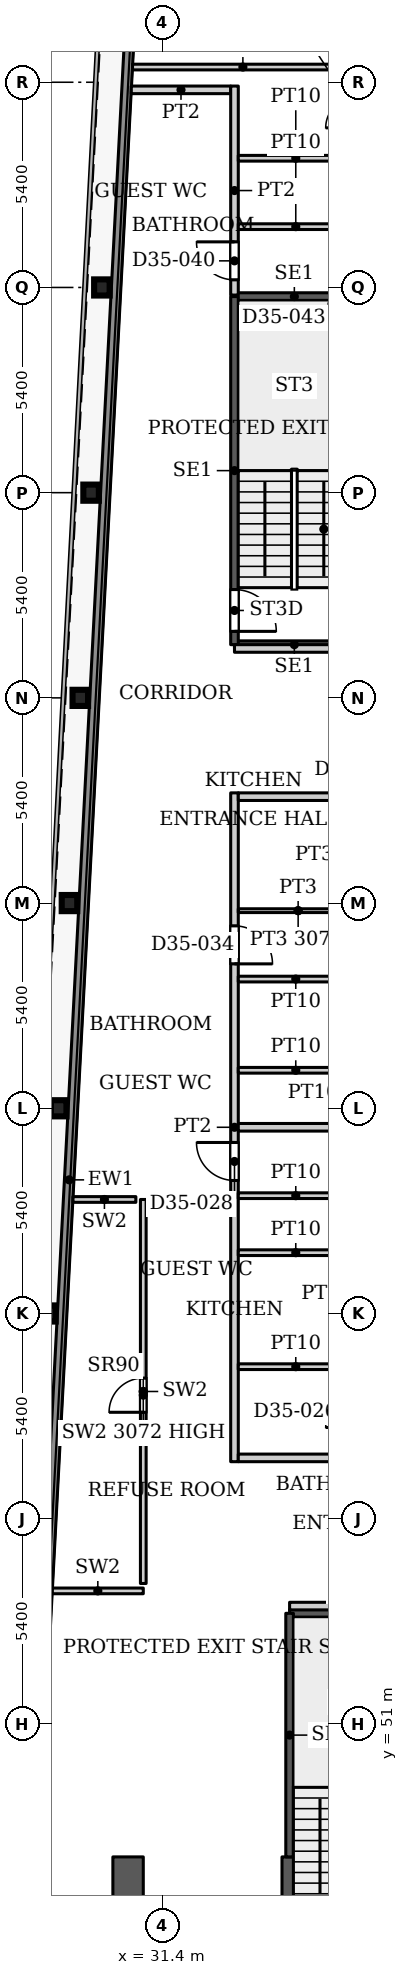
"""IFC4 building model, lengths in metres.
Left out: names, types, materials, properties, quantities, classifications, styles, units other than length and angle.
Written with IfcOpenShell. Run it as: python <this file> out.ifc"""

import sys

from ifc_helpers import new_model, si_unit, direction, frame, frame_2d, origin, origin_2d, place, context, subcontext, project, spatial, rectangle, i_section, extrude, source, transform, mapped, element, fill, save


model = new_model("IFC4")
c1 = context("Model", 3, precision=1e-05, world=origin(), true_north=direction((0.0, 1.0)))
c2 = subcontext(c1, "Body", "Model", "MODEL_VIEW")
j1 = project(units=[si_unit("LENGTHUNIT", "METRE"), si_unit("PLANEANGLEUNIT", "RADIAN")], contexts=[c1])
p1 = place(None, origin())
s1 = spatial("IfcSite", under=j1, at=p1, CompositionType="ELEMENT")
p2 = place(p1, origin())
s2 = spatial("IfcBuilding", under=s1, at=p2, CompositionType="ELEMENT")
p3 = place(p2, frame((0.0, 0.0, 156.5)))
s3 = spatial("IfcBuildingStorey", under=s2, at=p3, CompositionType="ELEMENT", Elevation=156.5)
for number, where, z_axis, x_axis in (
    (1, (28.39, 61.8, 0.0), (0.0, 0.0, 1.0), (1.0, 0.0, 0.0)),
    (2, (28.674, 67.2, 0.0), (0.0, 0.0, 1.0), (1.0, 0.0, 0.0)),
    (3, (28.958, 72.6, 0.0), (0.0, 0.0, 1.0), (1.0, 0.0, 0.0)),
    (4, (29.243, 78.0, 0.0), (0.0, 0.0, 1.0), (1.0, 0.0, 0.0)),
    (5, (29.527, 83.4, 0.0), (0.0, 0.0, 1.0), (1.0, 0.0, 0.0)),
    (6, (29.811, 88.8, 0.0), (0.0, 0.0, 1.0), (1.0, 0.0, 0.0)),
):
    element("IfcColumn", number, at=place(p3, frame(where, z_axis=z_axis, x_axis=x_axis)), inside=s3, PredefinedType="COLUMN", context=c2, shape_type="SweptSolid", body=[
        extrude(i_section(OverallWidth=0.409, OverallDepth=0.425, WebThickness=0.033, FlangeThickness=0.052, FilletRadius=0.013, at=origin_2d()), origin(), (0.0, 0.0, 1.0), 3.9),
    ])
p4 = place(p3, frame((34.75, 29.05, 0.0), z_axis=(0.0, 0.0, 1.0), x_axis=(0.0, 1.0, 0.0)))
e7 = element("IfcWall", 7, at=p4, inside=s3, PredefinedType="SHEAR", context=c2, shape_type="SweptSolid", body=[
    extrude(rectangle(XDim=18.45, YDim=0.4, at=frame_2d((9.225, 0.0))), origin(), (0.0, 0.0, 1.0), 3.9),
])
p5 = place(p4, frame((8.025, 0.0, 0.0)))
e8 = element("IfcOpeningElement", 8, at=p5, cuts=e7, PredefinedType="OPENING", context=c2, shape_type="SweptSolid", body=[
    extrude(rectangle(XDim=1.1, YDim=2.2, at=frame_2d((0.55, 1.1))), frame((0.0, 0.21, 0.0), z_axis=(0.0, -1.0, 0.0), x_axis=(1.0, 0.0, 0.0)), (0.0, 0.0, 1.0), 0.42),
])
p6 = place(p4, frame((10.875, 0.0, 0.0)))
e9 = element("IfcOpeningElement", 9, at=p6, cuts=e7, PredefinedType="OPENING", context=c2, shape_type="SweptSolid", body=[
    extrude(rectangle(XDim=1.1, YDim=2.2, at=frame_2d((0.55, 1.1))), frame((0.0, 0.21, 0.0), z_axis=(0.0, -1.0, 0.0), x_axis=(1.0, 0.0, 0.0)), (0.0, 0.0, 1.0), 0.42),
])
p7 = place(p4, frame((13.725, 0.0, 0.0)))
e10 = element("IfcOpeningElement", 10, at=p7, cuts=e7, PredefinedType="OPENING", context=c2, shape_type="SweptSolid", body=[
    extrude(rectangle(XDim=1.1, YDim=2.2, at=frame_2d((0.55, 1.1))), frame((0.0, 0.21, 0.0), z_axis=(0.0, -1.0, 0.0), x_axis=(1.0, 0.0, 0.0)), (0.0, 0.0, 1.0), 0.42),
])
p8 = place(p4, frame((15.95, 0.0, 0.0)))
e11 = element("IfcOpeningElement", 11, at=p8, cuts=e7, PredefinedType="OPENING", context=c2, shape_type="SweptSolid", body=[
    extrude(rectangle(XDim=1.1, YDim=2.2, at=frame_2d((0.55, 1.1))), frame((0.0, 0.21, 0.0), z_axis=(0.0, -1.0, 0.0), x_axis=(1.0, 0.0, 0.0)), (0.0, 0.0, 1.0), 0.42),
])
p9 = place(p3, frame((30.5, 29.05, 0.0), z_axis=(0.0, 0.0, 1.0), x_axis=(0.0, 1.0, 0.0)))
e12 = element("IfcWall", 12, at=p9, inside=s3, PredefinedType="SHEAR", context=c2, shape_type="SweptSolid", body=[
    extrude(rectangle(XDim=18.45, YDim=0.8, at=frame_2d((9.225, 0.0))), origin(), (0.0, 0.0, 1.0), 3.9),
])
p10 = place(p9, frame((6.55, 0.0, 0.0)))
e13 = element("IfcOpeningElement", 13, at=p10, cuts=e12, PredefinedType="OPENING", context=c2, shape_type="SweptSolid", body=[
    extrude(rectangle(XDim=0.9, YDim=2.2, at=frame_2d((0.45, 1.1))), frame((0.0, 0.41, 0.0), z_axis=(0.0, -1.0, 0.0), x_axis=(1.0, 0.0, 0.0)), (0.0, 0.0, 1.0), 0.82),
])
p11 = place(p9, frame((11.025, 0.0, 0.0)))
e14 = element("IfcOpeningElement", 14, at=p11, cuts=e12, PredefinedType="OPENING", context=c2, shape_type="SweptSolid", body=[
    extrude(rectangle(XDim=0.9, YDim=2.2, at=frame_2d((0.45, 1.1))), frame((0.0, 0.41, 0.0), z_axis=(0.0, -1.0, 0.0), x_axis=(1.0, 0.0, 0.0)), (0.0, 0.0, 1.0), 0.82),
])
p12 = place(p3, frame((27.195, 31.969, 0.0), z_axis=(0.0, 0.0, 1.0), x_axis=(0.052554995867, 0.998618031286, 0.0)))
e15 = element("IfcWall", 15, at=p12, inside=s3, PredefinedType="SOLIDWALL", context=c2, shape_type="SweptSolid", body=[
    extrude(rectangle(XDim=66.787, YDim=0.25, at=frame_2d((33.394, 0.0))), origin(), (0.0, 0.0, 1.0), 3.75),
])
p13 = place(p3, frame((34.75, 53.91, 0.0), z_axis=(0.0, 0.0, 1.0), x_axis=(1.0, 0.0, 0.0)))
e16 = element("IfcWall", 16, at=p13, inside=s3, PredefinedType="SHEAR", context=c2, shape_type="SweptSolid", body=[
    extrude(rectangle(XDim=3.15, YDim=0.2, at=frame_2d((1.575, 0.0))), origin(), (0.0, 0.0, 1.0), 3.9),
])
p14 = place(p3, frame((34.75, 47.5, 0.0), z_axis=(0.0, 0.0, 1.0), x_axis=(0.0, 1.0, 0.0)))
e17 = element("IfcWall", 17, at=p14, inside=s3, PredefinedType="SHEAR", context=c2, shape_type="SweptSolid", body=[
    extrude(rectangle(XDim=6.41, YDim=0.2, at=frame_2d((3.205, 0.0))), origin(), (0.0, 0.0, 1.0), 3.9),
])
for number, where, z_axis, x_axis in (
    (18, (33.3, 79.4, 0.0), (0.0, 0.0, 1.0), (1.0, 0.0, 0.0)),
    (19, (33.3, 88.56, 0.0), (0.0, 0.0, 1.0), (1.0, 0.0, 0.0)),
):
    element("IfcWall", number, at=place(p3, frame(where, z_axis=z_axis, x_axis=x_axis)), inside=s3, PredefinedType="SHEAR", context=c2, shape_type="SweptSolid", body=[
        extrude(rectangle(XDim=3.15, YDim=0.2, at=frame_2d((1.575, 0.0))), origin(), (0.0, 0.0, 1.0), 3.9),
    ])
p15 = place(p3, frame((33.3, 79.4, 0.0), z_axis=(0.0, 0.0, 1.0), x_axis=(0.0, 1.0, 0.0)))
e20 = element("IfcWall", 20, at=p15, inside=s3, PredefinedType="SHEAR", context=c2, shape_type="SweptSolid", body=[
    extrude(rectangle(XDim=9.16, YDim=0.2, at=frame_2d((4.58, 0.0))), origin(), (0.0, 0.0, 1.0), 3.9),
])
p16 = place(p15, frame((0.35, 0.0, 0.0)))
e21 = element("IfcOpeningElement", 21, at=p16, cuts=e20, PredefinedType="OPENING", context=c2, shape_type="SweptSolid", body=[
    extrude(rectangle(XDim=1.1, YDim=2.2, at=frame_2d((0.55, 1.1))), frame((0.0, 0.11, 0.0), z_axis=(0.0, -1.0, 0.0), x_axis=(1.0, 0.0, 0.0)), (0.0, 0.0, 1.0), 0.22),
])
p17 = place(p3, frame((28.508, 54.5, 0.0), z_axis=(0.0, 0.0, 1.0), x_axis=(1.0, 0.0, 0.0)))
e22 = element("IfcWall", 22, at=p17, inside=s3, PredefinedType="PARTITIONING", context=c2, shape_type="SweptSolid", body=[
    extrude(rectangle(XDim=2.392, YDim=0.15, at=frame_2d((1.196, 0.0))), origin(), (0.0, 0.0, 1.0), 3.9),
])
p18 = place(p3, frame((30.9, 54.695, 0.0), z_axis=(0.0, 0.0, 1.0), x_axis=(0.0, 1.0, 0.0)))
e23 = element("IfcWall", 23, at=p18, inside=s3, PredefinedType="PARTITIONING", context=c2, shape_type="SweptSolid", body=[
    extrude(rectangle(XDim=10.105, YDim=0.15, at=frame_2d((5.052, 0.0))), origin(), (0.0, 0.0, 1.0), 3.072),
])
p19 = place(p18, frame((4.505, 0.0, 0.0)))
e24 = element("IfcOpeningElement", 24, at=p19, cuts=e23, PredefinedType="OPENING", context=c2, shape_type="SweptSolid", body=[
    extrude(rectangle(XDim=0.9, YDim=2.2, at=frame_2d((0.45, 1.1))), frame((0.0, 0.085, 0.0), z_axis=(0.0, -1.0, 0.0), x_axis=(1.0, 0.0, 0.0)), (0.0, 0.0, 1.0), 0.17),
])
p20 = place(p3, frame((29.05, 64.8, 0.0), z_axis=(0.0, 0.0, 1.0), x_axis=(1.0, 0.0, 0.0)))
e25 = element("IfcWall", 25, at=p20, inside=s3, PredefinedType="PARTITIONING", context=c2, shape_type="SweptSolid", body=[
    extrude(rectangle(XDim=1.655, YDim=0.15, at=frame_2d((0.828, 0.0))), origin(), (0.0, 0.0, 1.0), 3.9),
])
p21 = place(p3, frame((30.617, 94.6, 0.0), z_axis=(0.0, 0.0, 1.0), x_axis=(1.0, 0.0, 0.0)))
e26 = element("IfcWall", 26, at=p21, inside=s3, PredefinedType="PARTITIONING", context=c2, shape_type="SweptSolid", body=[
    extrude(rectangle(XDim=5.808, YDim=0.15, at=frame_2d((2.904, 0.0))), origin(), (0.0, 0.0, 1.0), 3.6),
])
p22 = place(p3, frame((30.585, 94.0, 0.0), z_axis=(0.0, 0.0, 1.0), x_axis=(1.0, 0.0, 0.0)))
e27 = element("IfcWall", 27, at=p22, inside=s3, PredefinedType="PARTITIONING", context=c2, shape_type="SweptSolid", body=[
    extrude(rectangle(XDim=2.615, YDim=0.2, at=frame_2d((1.308, 0.0))), origin(), (0.0, 0.0, 1.0), 3.6),
])
p23 = place(p3, frame((33.3, 57.9, 0.0), z_axis=(0.0, 0.0, 1.0), x_axis=(0.0, 1.0, 0.0)))
e28 = element("IfcWall", 28, at=p23, inside=s3, PredefinedType="PARTITIONING", context=c2, shape_type="SweptSolid", body=[
    extrude(rectangle(XDim=17.6, YDim=0.2, at=frame_2d((8.8, 0.0))), origin(), (0.0, 0.0, 1.0), 3.6),
])
p24 = place(p23, frame((7.4, 0.0, 0.0)))
e29 = element("IfcOpeningElement", 29, at=p24, cuts=e28, PredefinedType="OPENING", context=c2, shape_type="SweptSolid", body=[
    extrude(rectangle(XDim=1.0, YDim=2.1, at=frame_2d((0.5, 1.05))), frame((0.0, 0.11, 0.0), z_axis=(0.0, -1.0, 0.0), x_axis=(1.0, 0.0, 0.0)), (0.0, 0.0, 1.0), 0.22),
])
p25 = place(p23, frame((13.1, 0.0, 0.0)))
e30 = element("IfcOpeningElement", 30, at=p25, cuts=e28, PredefinedType="OPENING", context=c2, shape_type="SweptSolid", body=[
    extrude(rectangle(XDim=1.0, YDim=2.1, at=frame_2d((0.5, 1.05))), frame((0.0, 0.11, 0.0), z_axis=(0.0, -1.0, 0.0), x_axis=(1.0, 0.0, 0.0)), (0.0, 0.0, 1.0), 0.22),
])
p26 = place(p3, frame((33.3, 79.3, 0.0), z_axis=(0.0, 0.0, 1.0), x_axis=(1.0, 0.0, 0.0)))
e31 = element("IfcWall", 31, at=p26, inside=s3, PredefinedType="PARTITIONING", context=c2, shape_type="SweptSolid", body=[
    extrude(rectangle(XDim=12.6, YDim=0.2, at=frame_2d((6.3, 0.0))), origin(), (0.0, 0.0, 1.0), 3.6),
])
p27 = place(p26, frame((5.795, 0.0, 0.0)))
e32 = element("IfcOpeningElement", 32, at=p27, cuts=e31, PredefinedType="OPENING", context=c2, shape_type="SweptSolid", body=[
    extrude(rectangle(XDim=1.0, YDim=2.1, at=frame_2d((0.5, 1.05))), frame((0.0, 0.11, 0.0), z_axis=(0.0, -1.0, 0.0), x_axis=(1.0, 0.0, 0.0)), (0.0, 0.0, 1.0), 0.22),
])
p28 = place(p3, frame((33.3, 88.6, 0.0), z_axis=(0.0, 0.0, 1.0), x_axis=(0.0, 1.0, 0.0)))
e33 = element("IfcWall", 33, at=p28, inside=s3, PredefinedType="PARTITIONING", context=c2, shape_type="SweptSolid", body=[
    extrude(rectangle(XDim=5.5, YDim=0.2, at=frame_2d((2.75, 0.0))), origin(), (0.0, 0.0, 1.0), 3.6),
])
p29 = place(p28, frame((0.4, 0.0, 0.0)))
e34 = element("IfcOpeningElement", 34, at=p29, cuts=e33, PredefinedType="OPENING", context=c2, shape_type="SweptSolid", body=[
    extrude(rectangle(XDim=1.0, YDim=2.1, at=frame_2d((0.5, 1.05))), frame((0.0, 0.11, 0.0), z_axis=(0.0, -1.0, 0.0), x_axis=(1.0, 0.0, 0.0)), (0.0, 0.0, 1.0), 0.22),
])
p30 = place(p3, frame((33.4, 58.0, 0.0), z_axis=(0.0, 0.0, 1.0), x_axis=(1.0, 0.0, 0.0)))
e35 = element("IfcWall", 35, at=p30, inside=s3, PredefinedType="PARTITIONING", context=c2, shape_type="SweptSolid", body=[
    extrude(rectangle(XDim=12.5, YDim=0.2, at=frame_2d((6.25, 0.0))), origin(), (0.0, 0.0, 1.0), 3.6),
])
for number, where, z_axis, x_axis in (
    (36, (33.4, 60.4, 0.0), (0.0, 0.0, 1.0), (1.0, 0.0, 0.0)),
    (37, (33.4, 63.4, 0.0), (0.0, 0.0, 1.0), (1.0, 0.0, 0.0)),
    (38, (33.4, 64.9, 0.0), (0.0, 0.0, 1.0), (1.0, 0.0, 0.0)),
):
    element("IfcWall", number, at=place(p3, frame(where, z_axis=z_axis, x_axis=x_axis)), inside=s3, PredefinedType="PARTITIONING", context=c2, shape_type="SweptSolid", body=[
        extrude(rectangle(XDim=3.025, YDim=0.15, at=frame_2d((1.513, 0.0))), origin(), (0.0, 0.0, 1.0), 3.6),
    ])
p31 = place(p3, frame((33.4, 66.7, 0.0), z_axis=(0.0, 0.0, 1.0), x_axis=(1.0, 0.0, 0.0)))
e39 = element("IfcWall", 39, at=p31, inside=s3, PredefinedType="PARTITIONING", context=c2, shape_type="SweptSolid", body=[
    extrude(rectangle(XDim=12.5, YDim=0.2, at=frame_2d((6.25, 0.0))), origin(), (0.0, 0.0, 1.0), 3.6),
])
for number, where, z_axis, x_axis in (
    (40, (33.4, 68.2, 0.0), (0.0, 0.0, 1.0), (1.0, 0.0, 0.0)),
    (41, (33.4, 70.6, 0.0), (0.0, 0.0, 1.0), (1.0, 0.0, 0.0)),
):
    element("IfcWall", number, at=place(p3, frame(where, z_axis=z_axis, x_axis=x_axis)), inside=s3, PredefinedType="PARTITIONING", context=c2, shape_type="SweptSolid", body=[
        extrude(rectangle(XDim=3.025, YDim=0.15, at=frame_2d((1.513, 0.0))), origin(), (0.0, 0.0, 1.0), 3.6),
    ])
p32 = place(p3, frame((33.4, 72.4, 0.0), z_axis=(0.0, 0.0, 1.0), x_axis=(1.0, 0.0, 0.0)))
e42 = element("IfcWall", 42, at=p32, inside=s3, PredefinedType="PARTITIONING", context=c2, shape_type="SweptSolid", body=[
    extrude(rectangle(XDim=3.15, YDim=0.1, at=frame_2d((1.575, 0.0))), origin(), (0.0, 0.0, 1.0), 3.072),
])
p33 = place(p3, frame((33.4, 75.4, 0.0), z_axis=(0.0, 0.0, 1.0), x_axis=(1.0, 0.0, 0.0)))
e43 = element("IfcWall", 43, at=p33, inside=s3, PredefinedType="PARTITIONING", context=c2, shape_type="SweptSolid", body=[
    extrude(rectangle(XDim=12.5, YDim=0.2, at=frame_2d((6.25, 0.0))), origin(), (0.0, 0.0, 1.0), 3.6),
])
for number, where, z_axis, x_axis in (
    (44, (33.4, 90.4, 0.0), (0.0, 0.0, 1.0), (1.0, 0.0, 0.0)),
    (45, (33.4, 92.2, 0.0), (0.0, 0.0, 1.0), (1.0, 0.0, 0.0)),
):
    element("IfcWall", number, at=place(p3, frame(where, z_axis=z_axis, x_axis=x_axis)), inside=s3, PredefinedType="PARTITIONING", context=c2, shape_type="SweptSolid", body=[
        extrude(rectangle(XDim=3.025, YDim=0.15, at=frame_2d((1.513, 0.0))), origin(), (0.0, 0.0, 1.0), 3.6),
    ])
p34 = place(p3, frame((34.75, 54.1, 0.0), z_axis=(0.0, 0.0, 1.0), x_axis=(1.0, 0.0, 0.0)))
e46 = element("IfcWall", 46, at=p34, inside=s3, PredefinedType="PARTITIONING", context=c2, shape_type="SweptSolid", body=[
    extrude(rectangle(XDim=11.15, YDim=0.2, at=frame_2d((5.575, 0.0))), origin(), (0.0, 0.0, 1.0), 3.6),
])
p35 = place(p34, frame((5.075, 0.0, 0.0)))
e47 = element("IfcOpeningElement", 47, at=p35, cuts=e46, PredefinedType="OPENING", context=c2, shape_type="SweptSolid", body=[
    extrude(rectangle(XDim=1.0, YDim=2.1, at=frame_2d((0.5, 1.05))), frame((0.0, 0.11, 0.0), z_axis=(0.0, -1.0, 0.0), x_axis=(1.0, 0.0, 0.0)), (0.0, 0.0, 1.0), 0.22),
])
m1 = source(origin(), c2, "Body", "SweptSolid", [
    extrude(rectangle(XDim=0.9, YDim=2.2, at=frame_2d((0.45, 1.1))), frame((0.0, 0.025, 0.0), z_axis=(0.0, -1.0, 0.0), x_axis=(1.0, 0.0, 0.0)), (0.0, 0.0, 1.0), 0.05),
])
p36 = place(p19, origin())
e48 = element("IfcDoor", 48, at=p36, inside=s3, OperationType="SINGLE_SWING_LEFT", PredefinedType="DOOR", context=c2, shape_type="MappedRepresentation", body=[
    mapped(m1, transform((0.0, 0.0, 0.0), x_axis=(1.0, 0.0, 0.0), y_axis=(0.0, 1.0, 0.0), z_axis=(0.0, 0.0, 1.0), scale=1.0)),
])
fill(e24, e48)
m2 = source(origin(), c2, "Body", "SweptSolid", [
    extrude(rectangle(XDim=1.1, YDim=2.2, at=frame_2d((0.55, 1.1))), frame((0.0, 0.025, 0.0), z_axis=(0.0, -1.0, 0.0), x_axis=(1.0, 0.0, 0.0)), (0.0, 0.0, 1.0), 0.05),
])
p37 = place(p16, origin())
e49 = element("IfcDoor", 49, at=p37, inside=s3, OperationType="SINGLE_SWING_RIGHT", PredefinedType="DOOR", context=c2, shape_type="MappedRepresentation", body=[
    mapped(m2, transform((0.0, 0.0, 0.0), x_axis=(1.0, 0.0, 0.0), y_axis=(0.0, 1.0, 0.0), z_axis=(0.0, 0.0, 1.0), scale=1.0)),
])
fill(e21, e49)
m3 = source(origin(), c2, "Body", "SweptSolid", [
    extrude(rectangle(XDim=1.0, YDim=2.1, at=frame_2d((0.5, 1.05))), frame((0.0, 0.025, 0.0), z_axis=(0.0, -1.0, 0.0), x_axis=(1.0, 0.0, 0.0)), (0.0, 0.0, 1.0), 0.05),
])
p38 = place(p24, origin())
e50 = element("IfcDoor", 50, at=p38, inside=s3, OperationType="SINGLE_SWING_LEFT", PredefinedType="DOOR", context=c2, shape_type="MappedRepresentation", body=[
    mapped(m3, transform((0.0, 0.0, 0.0), x_axis=(1.0, 0.0, 0.0), y_axis=(0.0, 1.0, 0.0), z_axis=(0.0, 0.0, 1.0), scale=1.0)),
])
fill(e29, e50)
p39 = place(p25, origin())
e51 = element("IfcDoor", 51, at=p39, inside=s3, OperationType="SINGLE_SWING_RIGHT", PredefinedType="DOOR", context=c2, shape_type="MappedRepresentation", body=[
    mapped(m3, transform((0.0, 0.0, 0.0), x_axis=(1.0, 0.0, 0.0), y_axis=(0.0, 1.0, 0.0), z_axis=(0.0, 0.0, 1.0), scale=1.0)),
])
fill(e30, e51)
p40 = place(p29, origin())
e52 = element("IfcDoor", 52, at=p40, inside=s3, OperationType="SINGLE_SWING_LEFT", PredefinedType="DOOR", context=c2, shape_type="MappedRepresentation", body=[
    mapped(m3, transform((0.0, 0.0, 0.0), x_axis=(1.0, 0.0, 0.0), y_axis=(0.0, 1.0, 0.0), z_axis=(0.0, 0.0, 1.0), scale=1.0)),
])
fill(e34, e52)
save(model, sys.argv[1])
